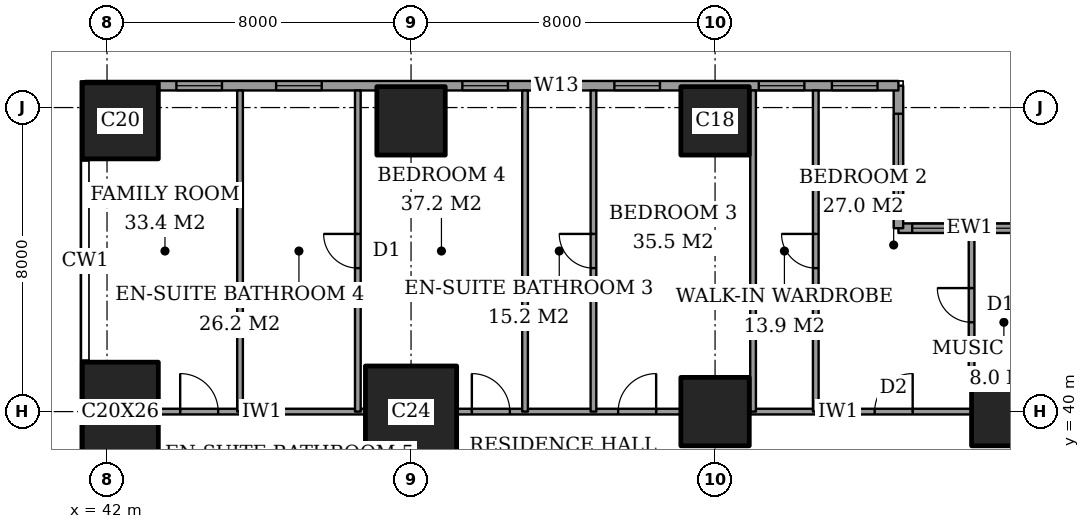
"""IFC4 building model, lengths in metres.
Left out: names, types, materials, properties, quantities, classifications, styles, units other than length and angle.
Written with IfcOpenShell. Run it as: python <this file> out.ifc"""

import sys

from ifc_helpers import new_model, si_unit, direction, frame, frame_2d, origin, origin_2d, place, context, subcontext, project, spatial, rectangle, extrude, element, fill, save


model = new_model("IFC4")
c1 = context("Model", 3, precision=1e-05, world=origin(), true_north=direction((0.0, 1.0)))
c2 = subcontext(c1, "Body", "Model", "MODEL_VIEW")
j1 = project(units=[si_unit("LENGTHUNIT", "METRE"), si_unit("PLANEANGLEUNIT", "RADIAN")], contexts=[c1])
p1 = place(None, origin())
s1 = spatial("IfcSite", under=j1, at=p1, CompositionType="ELEMENT")
p2 = place(p1, origin())
s2 = spatial("IfcBuilding", under=s1, at=p2, CompositionType="ELEMENT")
p3 = place(p2, frame((0.0, 0.0, 185.8)))
s3 = spatial("IfcBuildingStorey", under=s2, at=p3, CompositionType="ELEMENT", Elevation=185.8)
p4 = place(p3, frame((42.35, 40.0, 0.0), z_axis=(0.0, 0.0, 1.0), x_axis=(1.0, 0.0, 0.0)))
e1 = element("IfcColumn", 1, at=p4, inside=s3, PredefinedType="COLUMN", context=c2, shape_type="SweptSolid", body=[
    extrude(rectangle(XDim=2.0, YDim=2.6, at=origin_2d()), origin(), (0.0, 0.0, 1.0), 3.6),
])
p5 = place(p3, frame((42.35, 47.65, 0.0), z_axis=(0.0, 0.0, 1.0), x_axis=(1.0, 0.0, 0.0)))
e2 = element("IfcColumn", 2, at=p5, inside=s3, PredefinedType="COLUMN", context=c2, shape_type="SweptSolid", body=[
    extrude(rectangle(XDim=2.0, YDim=2.0, at=origin_2d()), origin(), (0.0, 0.0, 1.0), 3.6),
])
p6 = place(p3, frame((50.0, 40.0, 0.0), z_axis=(0.0, 0.0, 1.0), x_axis=(1.0, 0.0, 0.0)))
e3 = element("IfcColumn", 3, at=p6, inside=s3, PredefinedType="COLUMN", context=c2, shape_type="SweptSolid", body=[
    extrude(rectangle(XDim=2.4, YDim=2.4, at=origin_2d()), origin(), (0.0, 0.0, 1.0), 3.6),
])
for number, where, z_axis, x_axis in (
    (4, (50.0, 47.65, 0.0), (0.0, 0.0, 1.0), (1.0, 0.0, 0.0)),
    (5, (58.0, 40.0, 0.0), (0.0, 0.0, 1.0), (1.0, 0.0, 0.0)),
    (6, (58.0, 47.65, 0.0), (0.0, 0.0, 1.0), (1.0, 0.0, 0.0)),
    (7, (65.65, 40.0, 0.0), (0.0, 0.0, 1.0), (1.0, 0.0, 0.0)),
):
    element("IfcColumn", number, at=place(p3, frame(where, z_axis=z_axis, x_axis=x_axis)), inside=s3, PredefinedType="COLUMN", context=c2, shape_type="SweptSolid", body=[
        extrude(rectangle(XDim=1.8, YDim=1.8, at=origin_2d()), origin(), (0.0, 0.0, 1.0), 3.6),
    ])
p7 = place(p3, frame((66.575, 44.825, 0.0), z_axis=(0.0, 0.0, 1.0), x_axis=(-1.0, 0.0, 0.0)))
e8 = element("IfcWall", 8, at=p7, inside=s3, PredefinedType="SOLIDWALL", context=c2, shape_type="SweptSolid", body=[
    extrude(rectangle(XDim=3.75, YDim=0.25, at=frame_2d((1.875, 0.0))), origin(), (0.0, 0.0, 1.0), 3.6),
])
p8 = place(p7, frame((0.45, 0.0, 0.2)))
e9 = element("IfcOpeningElement", 9, at=p8, cuts=e8, PredefinedType="OPENING", context=c2, shape_type="SweptSolid", body=[
    extrude(rectangle(XDim=1.2, YDim=2.4, at=frame_2d((0.6, 1.2))), frame((0.0, 0.135, 0.0), z_axis=(0.0, -1.0, 0.0), x_axis=(1.0, 0.0, 0.0)), (0.0, 0.0, 1.0), 0.27),
])
p9 = place(p7, frame((2.188, 0.0, 0.2)))
e10 = element("IfcOpeningElement", 10, at=p9, cuts=e8, PredefinedType="OPENING", context=c2, shape_type="SweptSolid", body=[
    extrude(rectangle(XDim=1.2, YDim=2.4, at=frame_2d((0.6, 1.2))), frame((0.0, 0.135, 0.0), z_axis=(0.0, -1.0, 0.0), x_axis=(1.0, 0.0, 0.0)), (0.0, 0.0, 1.0), 0.27),
])
p10 = place(p3, frame((62.825, 44.825, 0.0), z_axis=(0.0, 0.0, 1.0), x_axis=(0.0, 1.0, 0.0)))
e11 = element("IfcWall", 11, at=p10, inside=s3, PredefinedType="SOLIDWALL", context=c2, shape_type="SweptSolid", body=[
    extrude(rectangle(XDim=3.75, YDim=0.25, at=frame_2d((1.875, 0.0))), origin(), (0.0, 0.0, 1.0), 3.6),
])
p11 = place(p10, frame((0.613, 0.0, 0.2)))
e12 = element("IfcOpeningElement", 12, at=p11, cuts=e11, PredefinedType="OPENING", context=c2, shape_type="SweptSolid", body=[
    extrude(rectangle(XDim=2.4, YDim=2.4, at=frame_2d((1.2, 1.2))), frame((0.0, 0.135, 0.0), z_axis=(0.0, -1.0, 0.0), x_axis=(1.0, 0.0, 0.0)), (0.0, 0.0, 1.0), 0.27),
])
p12 = place(p3, frame((62.825, 48.575, 0.0), z_axis=(0.0, 0.0, 1.0), x_axis=(-1.0, 0.0, 0.0)))
e13 = element("IfcWall", 13, at=p12, inside=s3, PredefinedType="SOLIDWALL", context=c2, shape_type="SweptSolid", body=[
    extrude(rectangle(XDim=21.4, YDim=0.25, at=frame_2d((10.7, 0.0))), origin(), (0.0, 0.0, 1.0), 3.6),
])
p13 = place(p12, frame((0.55, 0.0, 0.2)))
e14 = element("IfcOpeningElement", 14, at=p13, cuts=e13, PredefinedType="OPENING", context=c2, shape_type="SweptSolid", body=[
    extrude(rectangle(XDim=1.2, YDim=2.4, at=frame_2d((0.6, 1.2))), frame((0.0, 0.135, 0.0), z_axis=(0.0, -1.0, 0.0), x_axis=(1.0, 0.0, 0.0)), (0.0, 0.0, 1.0), 0.27),
])
p14 = place(p12, frame((2.475, 0.0, 0.2)))
e15 = element("IfcOpeningElement", 15, at=p14, cuts=e13, PredefinedType="OPENING", context=c2, shape_type="SweptSolid", body=[
    extrude(rectangle(XDim=1.2, YDim=2.4, at=frame_2d((0.6, 1.2))), frame((0.0, 0.135, 0.0), z_axis=(0.0, -1.0, 0.0), x_axis=(1.0, 0.0, 0.0)), (0.0, 0.0, 1.0), 0.27),
])
p15 = place(p12, frame((6.275, 0.0, 0.2)))
e16 = element("IfcOpeningElement", 16, at=p15, cuts=e13, PredefinedType="OPENING", context=c2, shape_type="SweptSolid", body=[
    extrude(rectangle(XDim=1.2, YDim=2.4, at=frame_2d((0.6, 1.2))), frame((0.0, 0.135, 0.0), z_axis=(0.0, -1.0, 0.0), x_axis=(1.0, 0.0, 0.0)), (0.0, 0.0, 1.0), 0.27),
])
p16 = place(p12, frame((8.4, 0.0, 0.2)))
e17 = element("IfcOpeningElement", 17, at=p16, cuts=e13, PredefinedType="OPENING", context=c2, shape_type="SweptSolid", body=[
    extrude(rectangle(XDim=1.2, YDim=2.4, at=frame_2d((0.6, 1.2))), frame((0.0, 0.135, 0.0), z_axis=(0.0, -1.0, 0.0), x_axis=(1.0, 0.0, 0.0)), (0.0, 0.0, 1.0), 0.27),
])
p17 = place(p12, frame((10.275, 0.0, 0.2)))
e18 = element("IfcOpeningElement", 18, at=p17, cuts=e13, PredefinedType="OPENING", context=c2, shape_type="SweptSolid", body=[
    extrude(rectangle(XDim=1.2, YDim=2.4, at=frame_2d((0.6, 1.2))), frame((0.0, 0.135, 0.0), z_axis=(0.0, -1.0, 0.0), x_axis=(1.0, 0.0, 0.0)), (0.0, 0.0, 1.0), 0.27),
])
p18 = place(p12, frame((15.175, 0.0, 0.2)))
e19 = element("IfcOpeningElement", 19, at=p18, cuts=e13, PredefinedType="OPENING", context=c2, shape_type="SweptSolid", body=[
    extrude(rectangle(XDim=1.2, YDim=2.4, at=frame_2d((0.6, 1.2))), frame((0.0, 0.135, 0.0), z_axis=(0.0, -1.0, 0.0), x_axis=(1.0, 0.0, 0.0)), (0.0, 0.0, 1.0), 0.27),
])
p19 = place(p12, frame((17.8, 0.0, 0.2)))
e20 = element("IfcOpeningElement", 20, at=p19, cuts=e13, PredefinedType="OPENING", context=c2, shape_type="SweptSolid", body=[
    extrude(rectangle(XDim=1.2, YDim=2.4, at=frame_2d((0.6, 1.2))), frame((0.0, 0.135, 0.0), z_axis=(0.0, -1.0, 0.0), x_axis=(1.0, 0.0, 0.0)), (0.0, 0.0, 1.0), 0.27),
])
p20 = place(p3, frame((43.35, 40.0, 0.0), z_axis=(0.0, 0.0, 1.0), x_axis=(1.0, 0.0, 0.0)))
e21 = element("IfcWall", 21, at=p20, inside=s3, PredefinedType="PARTITIONING", context=c2, shape_type="SweptSolid", body=[
    extrude(rectangle(XDim=5.45, YDim=0.15, at=frame_2d((2.725, 0.0))), origin(), (0.0, 0.0, 1.0), 3.35),
])
p21 = place(p20, frame((0.575, 0.0, 0.0)))
e22 = element("IfcOpeningElement", 22, at=p21, cuts=e21, PredefinedType="OPENING", context=c2, shape_type="SweptSolid", body=[
    extrude(rectangle(XDim=1.0, YDim=2.1, at=frame_2d((0.5, 1.05))), frame((0.0, 0.085, 0.0), z_axis=(0.0, -1.0, 0.0), x_axis=(1.0, 0.0, 0.0)), (0.0, 0.0, 1.0), 0.17),
])
p22 = place(p3, frame((51.2, 40.0, 0.0), z_axis=(0.0, 0.0, 1.0), x_axis=(1.0, 0.0, 0.0)))
e23 = element("IfcWall", 23, at=p22, inside=s3, PredefinedType="PARTITIONING", context=c2, shape_type="SweptSolid", body=[
    extrude(rectangle(XDim=5.9, YDim=0.15, at=frame_2d((2.95, 0.0))), origin(), (0.0, 0.0, 1.0), 3.35),
])
p23 = place(p22, frame((4.25, 0.0, 0.0)))
e24 = element("IfcOpeningElement", 24, at=p23, cuts=e23, PredefinedType="OPENING", context=c2, shape_type="SweptSolid", body=[
    extrude(rectangle(XDim=1.0, YDim=2.1, at=frame_2d((0.5, 1.05))), frame((0.0, 0.085, 0.0), z_axis=(0.0, -1.0, 0.0), x_axis=(1.0, 0.0, 0.0)), (0.0, 0.0, 1.0), 0.17),
])
p24 = place(p22, frame((0.4, 0.0, 0.0)))
e25 = element("IfcOpeningElement", 25, at=p24, cuts=e23, PredefinedType="OPENING", context=c2, shape_type="SweptSolid", body=[
    extrude(rectangle(XDim=1.0, YDim=2.1, at=frame_2d((0.5, 1.05))), frame((0.0, 0.085, 0.0), z_axis=(0.0, -1.0, 0.0), x_axis=(1.0, 0.0, 0.0)), (0.0, 0.0, 1.0), 0.17),
])
p25 = place(p3, frame((58.9, 40.0, 0.0), z_axis=(0.0, 0.0, 1.0), x_axis=(1.0, 0.0, 0.0)))
e26 = element("IfcWall", 26, at=p25, inside=s3, PredefinedType="PARTITIONING", context=c2, shape_type="SweptSolid", body=[
    extrude(rectangle(XDim=5.85, YDim=0.15, at=frame_2d((2.925, 0.0))), origin(), (0.0, 0.0, 1.0), 3.35),
])
p26 = place(p25, frame((3.3, 0.0, 0.0)))
e27 = element("IfcOpeningElement", 27, at=p26, cuts=e26, PredefinedType="OPENING", context=c2, shape_type="SweptSolid", body=[
    extrude(rectangle(XDim=1.0, YDim=2.1, at=frame_2d((0.5, 1.05))), frame((0.0, 0.085, 0.0), z_axis=(0.0, -1.0, 0.0), x_axis=(1.0, 0.0, 0.0)), (0.0, 0.0, 1.0), 0.17),
])
p27 = place(p3, frame((45.5, 40.0, 0.0), z_axis=(0.0, 0.0, 1.0), x_axis=(0.0, 1.0, 0.0)))
e28 = element("IfcWall", 28, at=p27, inside=s3, PredefinedType="PARTITIONING", context=c2, shape_type="SweptSolid", body=[
    extrude(rectangle(XDim=8.45, YDim=0.15, at=frame_2d((4.225, 0.0))), origin(), (0.0, 0.0, 1.0), 3.35),
])
p28 = place(p3, frame((48.6, 40.0, 0.0), z_axis=(0.0, 0.0, 1.0), x_axis=(0.0, 1.0, 0.0)))
e29 = element("IfcWall", 29, at=p28, inside=s3, PredefinedType="PARTITIONING", context=c2, shape_type="SweptSolid", body=[
    extrude(rectangle(XDim=8.45, YDim=0.15, at=frame_2d((4.225, 0.0))), origin(), (0.0, 0.0, 1.0), 3.35),
])
p29 = place(p28, frame((3.775, 0.0, 0.0)))
e30 = element("IfcOpeningElement", 30, at=p29, cuts=e29, PredefinedType="OPENING", context=c2, shape_type="SweptSolid", body=[
    extrude(rectangle(XDim=0.9, YDim=2.1, at=frame_2d((0.45, 1.05))), frame((0.0, 0.085, 0.0), z_axis=(0.0, -1.0, 0.0), x_axis=(1.0, 0.0, 0.0)), (0.0, 0.0, 1.0), 0.17),
])
p30 = place(p3, frame((53.0, 40.0, 0.0), z_axis=(0.0, 0.0, 1.0), x_axis=(0.0, 1.0, 0.0)))
e31 = element("IfcWall", 31, at=p30, inside=s3, PredefinedType="PARTITIONING", context=c2, shape_type="SweptSolid", body=[
    extrude(rectangle(XDim=8.45, YDim=0.15, at=frame_2d((4.225, 0.0))), origin(), (0.0, 0.0, 1.0), 3.35),
])
p31 = place(p3, frame((54.8, 40.0, 0.0), z_axis=(0.0, 0.0, 1.0), x_axis=(0.0, 1.0, 0.0)))
e32 = element("IfcWall", 32, at=p31, inside=s3, PredefinedType="PARTITIONING", context=c2, shape_type="SweptSolid", body=[
    extrude(rectangle(XDim=8.45, YDim=0.15, at=frame_2d((4.225, 0.0))), origin(), (0.0, 0.0, 1.0), 3.35),
])
p32 = place(p31, frame((3.775, 0.0, 0.0)))
e33 = element("IfcOpeningElement", 33, at=p32, cuts=e32, PredefinedType="OPENING", context=c2, shape_type="SweptSolid", body=[
    extrude(rectangle(XDim=0.9, YDim=2.1, at=frame_2d((0.45, 1.05))), frame((0.0, 0.085, 0.0), z_axis=(0.0, -1.0, 0.0), x_axis=(1.0, 0.0, 0.0)), (0.0, 0.0, 1.0), 0.17),
])
p33 = place(p3, frame((59.0, 40.0, 0.0), z_axis=(0.0, 0.0, 1.0), x_axis=(0.0, 1.0, 0.0)))
e34 = element("IfcWall", 34, at=p33, inside=s3, PredefinedType="PARTITIONING", context=c2, shape_type="SweptSolid", body=[
    extrude(rectangle(XDim=8.45, YDim=0.15, at=frame_2d((4.225, 0.0))), origin(), (0.0, 0.0, 1.0), 3.35),
])
p34 = place(p3, frame((60.65, 40.0, 0.0), z_axis=(0.0, 0.0, 1.0), x_axis=(0.0, 1.0, 0.0)))
e35 = element("IfcWall", 35, at=p34, inside=s3, PredefinedType="PARTITIONING", context=c2, shape_type="SweptSolid", body=[
    extrude(rectangle(XDim=8.45, YDim=0.15, at=frame_2d((4.225, 0.0))), origin(), (0.0, 0.0, 1.0), 3.35),
])
p35 = place(p34, frame((3.775, 0.0, 0.0)))
e36 = element("IfcOpeningElement", 36, at=p35, cuts=e35, PredefinedType="OPENING", context=c2, shape_type="SweptSolid", body=[
    extrude(rectangle(XDim=0.9, YDim=2.1, at=frame_2d((0.45, 1.05))), frame((0.0, 0.085, 0.0), z_axis=(0.0, -1.0, 0.0), x_axis=(1.0, 0.0, 0.0)), (0.0, 0.0, 1.0), 0.17),
])
p36 = place(p3, frame((64.75, 40.9, 0.0), z_axis=(0.0, 0.0, 1.0), x_axis=(0.0, 1.0, 0.0)))
e37 = element("IfcWall", 37, at=p36, inside=s3, PredefinedType="PARTITIONING", context=c2, shape_type="SweptSolid", body=[
    extrude(rectangle(XDim=3.8, YDim=0.15, at=frame_2d((1.9, 0.0))), origin(), (0.0, 0.0, 1.0), 3.35),
])
p37 = place(p36, frame((1.45, 0.0, 0.0)))
e38 = element("IfcOpeningElement", 38, at=p37, cuts=e37, PredefinedType="OPENING", context=c2, shape_type="SweptSolid", body=[
    extrude(rectangle(XDim=0.9, YDim=2.1, at=frame_2d((0.45, 1.05))), frame((0.0, 0.085, 0.0), z_axis=(0.0, -1.0, 0.0), x_axis=(1.0, 0.0, 0.0)), (0.0, 0.0, 1.0), 0.17),
])
p38 = place(p8, origin())
e39 = element("IfcWindow", 39, at=p38, inside=s3, PartitioningType="SINGLE_PANEL", PredefinedType="WINDOW", context=c2, shape_type="SweptSolid", body=[
    extrude(rectangle(XDim=1.2, YDim=2.4, at=frame_2d((0.6, 1.2))), frame((0.0, 0.03, 0.0), z_axis=(0.0, -1.0, 0.0), x_axis=(1.0, 0.0, 0.0)), (0.0, 0.0, 1.0), 0.06),
])
fill(e9, e39)
p39 = place(p9, origin())
e40 = element("IfcWindow", 40, at=p39, inside=s3, PartitioningType="SINGLE_PANEL", PredefinedType="WINDOW", context=c2, shape_type="SweptSolid", body=[
    extrude(rectangle(XDim=1.2, YDim=2.4, at=frame_2d((0.6, 1.2))), frame((0.0, 0.03, 0.0), z_axis=(0.0, -1.0, 0.0), x_axis=(1.0, 0.0, 0.0)), (0.0, 0.0, 1.0), 0.06),
])
fill(e10, e40)
p40 = place(p11, origin())
e41 = element("IfcWindow", 41, at=p40, inside=s3, PartitioningType="SINGLE_PANEL", PredefinedType="WINDOW", context=c2, shape_type="SweptSolid", body=[
    extrude(rectangle(XDim=2.4, YDim=2.4, at=frame_2d((1.2, 1.2))), frame((0.0, 0.03, 0.0), z_axis=(0.0, -1.0, 0.0), x_axis=(1.0, 0.0, 0.0)), (0.0, 0.0, 1.0), 0.06),
])
fill(e12, e41)
p41 = place(p13, origin())
e42 = element("IfcWindow", 42, at=p41, inside=s3, PartitioningType="SINGLE_PANEL", PredefinedType="WINDOW", context=c2, shape_type="SweptSolid", body=[
    extrude(rectangle(XDim=1.2, YDim=2.4, at=frame_2d((0.6, 1.2))), frame((0.0, 0.03, 0.0), z_axis=(0.0, -1.0, 0.0), x_axis=(1.0, 0.0, 0.0)), (0.0, 0.0, 1.0), 0.06),
])
fill(e14, e42)
p42 = place(p14, origin())
e43 = element("IfcWindow", 43, at=p42, inside=s3, PartitioningType="SINGLE_PANEL", PredefinedType="WINDOW", context=c2, shape_type="SweptSolid", body=[
    extrude(rectangle(XDim=1.2, YDim=2.4, at=frame_2d((0.6, 1.2))), frame((0.0, 0.03, 0.0), z_axis=(0.0, -1.0, 0.0), x_axis=(1.0, 0.0, 0.0)), (0.0, 0.0, 1.0), 0.06),
])
fill(e15, e43)
p43 = place(p15, origin())
e44 = element("IfcWindow", 44, at=p43, inside=s3, PartitioningType="SINGLE_PANEL", PredefinedType="WINDOW", context=c2, shape_type="SweptSolid", body=[
    extrude(rectangle(XDim=1.2, YDim=2.4, at=frame_2d((0.6, 1.2))), frame((0.0, 0.03, 0.0), z_axis=(0.0, -1.0, 0.0), x_axis=(1.0, 0.0, 0.0)), (0.0, 0.0, 1.0), 0.06),
])
fill(e16, e44)
p44 = place(p16, origin())
e45 = element("IfcWindow", 45, at=p44, inside=s3, PartitioningType="SINGLE_PANEL", PredefinedType="WINDOW", context=c2, shape_type="SweptSolid", body=[
    extrude(rectangle(XDim=1.2, YDim=2.4, at=frame_2d((0.6, 1.2))), frame((0.0, 0.03, 0.0), z_axis=(0.0, -1.0, 0.0), x_axis=(1.0, 0.0, 0.0)), (0.0, 0.0, 1.0), 0.06),
])
fill(e17, e45)
p45 = place(p17, origin())
e46 = element("IfcWindow", 46, at=p45, inside=s3, PartitioningType="SINGLE_PANEL", PredefinedType="WINDOW", context=c2, shape_type="SweptSolid", body=[
    extrude(rectangle(XDim=1.2, YDim=2.4, at=frame_2d((0.6, 1.2))), frame((0.0, 0.03, 0.0), z_axis=(0.0, -1.0, 0.0), x_axis=(1.0, 0.0, 0.0)), (0.0, 0.0, 1.0), 0.06),
])
fill(e18, e46)
p46 = place(p18, origin())
e47 = element("IfcWindow", 47, at=p46, inside=s3, PartitioningType="SINGLE_PANEL", PredefinedType="WINDOW", context=c2, shape_type="SweptSolid", body=[
    extrude(rectangle(XDim=1.2, YDim=2.4, at=frame_2d((0.6, 1.2))), frame((0.0, 0.03, 0.0), z_axis=(0.0, -1.0, 0.0), x_axis=(1.0, 0.0, 0.0)), (0.0, 0.0, 1.0), 0.06),
])
fill(e19, e47)
p47 = place(p19, origin())
e48 = element("IfcWindow", 48, at=p47, inside=s3, PartitioningType="SINGLE_PANEL", PredefinedType="WINDOW", context=c2, shape_type="SweptSolid", body=[
    extrude(rectangle(XDim=1.2, YDim=2.4, at=frame_2d((0.6, 1.2))), frame((0.0, 0.03, 0.0), z_axis=(0.0, -1.0, 0.0), x_axis=(1.0, 0.0, 0.0)), (0.0, 0.0, 1.0), 0.06),
])
fill(e20, e48)
p48 = place(p37, origin())
e49 = element("IfcDoor", 49, at=p48, inside=s3, OperationType="SINGLE_SWING_LEFT", PredefinedType="DOOR", context=c2, shape_type="SweptSolid", body=[
    extrude(rectangle(XDim=0.9, YDim=2.1, at=frame_2d((0.45, 1.05))), frame((0.0, 0.025, 0.0), z_axis=(0.0, -1.0, 0.0), x_axis=(1.0, 0.0, 0.0)), (0.0, 0.0, 1.0), 0.05),
])
fill(e38, e49)
p49 = place(p26, origin())
e50 = element("IfcDoor", 50, at=p49, inside=s3, OperationType="SINGLE_SWING_LEFT", PredefinedType="DOOR", context=c2, shape_type="SweptSolid", body=[
    extrude(rectangle(XDim=1.0, YDim=2.1, at=frame_2d((0.5, 1.05))), frame((0.0, 0.025, 0.0), z_axis=(0.0, -1.0, 0.0), x_axis=(1.0, 0.0, 0.0)), (0.0, 0.0, 1.0), 0.05),
])
fill(e27, e50)
p50 = place(p35, origin())
e51 = element("IfcDoor", 51, at=p50, inside=s3, OperationType="SINGLE_SWING_LEFT", PredefinedType="DOOR", context=c2, shape_type="SweptSolid", body=[
    extrude(rectangle(XDim=0.9, YDim=2.1, at=frame_2d((0.45, 1.05))), frame((0.0, 0.025, 0.0), z_axis=(0.0, -1.0, 0.0), x_axis=(1.0, 0.0, 0.0)), (0.0, 0.0, 1.0), 0.05),
])
fill(e36, e51)
p51 = place(p23, origin())
e52 = element("IfcDoor", 52, at=p51, inside=s3, OperationType="SINGLE_SWING_LEFT", PredefinedType="DOOR", context=c2, shape_type="SweptSolid", body=[
    extrude(rectangle(XDim=1.0, YDim=2.1, at=frame_2d((0.5, 1.05))), frame((0.0, 0.025, 0.0), z_axis=(0.0, -1.0, 0.0), x_axis=(1.0, 0.0, 0.0)), (0.0, 0.0, 1.0), 0.05),
])
fill(e24, e52)
p52 = place(p32, origin())
e53 = element("IfcDoor", 53, at=p52, inside=s3, OperationType="SINGLE_SWING_LEFT", PredefinedType="DOOR", context=c2, shape_type="SweptSolid", body=[
    extrude(rectangle(XDim=0.9, YDim=2.1, at=frame_2d((0.45, 1.05))), frame((0.0, 0.025, 0.0), z_axis=(0.0, -1.0, 0.0), x_axis=(1.0, 0.0, 0.0)), (0.0, 0.0, 1.0), 0.05),
])
fill(e33, e53)
p53 = place(p24, origin())
e54 = element("IfcDoor", 54, at=p53, inside=s3, OperationType="SINGLE_SWING_RIGHT", PredefinedType="DOOR", context=c2, shape_type="SweptSolid", body=[
    extrude(rectangle(XDim=1.0, YDim=2.1, at=frame_2d((0.5, 1.05))), frame((0.0, 0.025, 0.0), z_axis=(0.0, -1.0, 0.0), x_axis=(1.0, 0.0, 0.0)), (0.0, 0.0, 1.0), 0.05),
])
fill(e25, e54)
p54 = place(p29, origin())
e55 = element("IfcDoor", 55, at=p54, inside=s3, OperationType="SINGLE_SWING_LEFT", PredefinedType="DOOR", context=c2, shape_type="SweptSolid", body=[
    extrude(rectangle(XDim=0.9, YDim=2.1, at=frame_2d((0.45, 1.05))), frame((0.0, 0.025, 0.0), z_axis=(0.0, -1.0, 0.0), x_axis=(1.0, 0.0, 0.0)), (0.0, 0.0, 1.0), 0.05),
])
fill(e30, e55)
p55 = place(p21, origin())
e56 = element("IfcDoor", 56, at=p55, inside=s3, OperationType="SINGLE_SWING_RIGHT", PredefinedType="DOOR", context=c2, shape_type="SweptSolid", body=[
    extrude(rectangle(XDim=1.0, YDim=2.1, at=frame_2d((0.5, 1.05))), frame((0.0, 0.025, 0.0), z_axis=(0.0, -1.0, 0.0), x_axis=(1.0, 0.0, 0.0)), (0.0, 0.0, 1.0), 0.05),
])
fill(e22, e56)
save(model, sys.argv[1])
